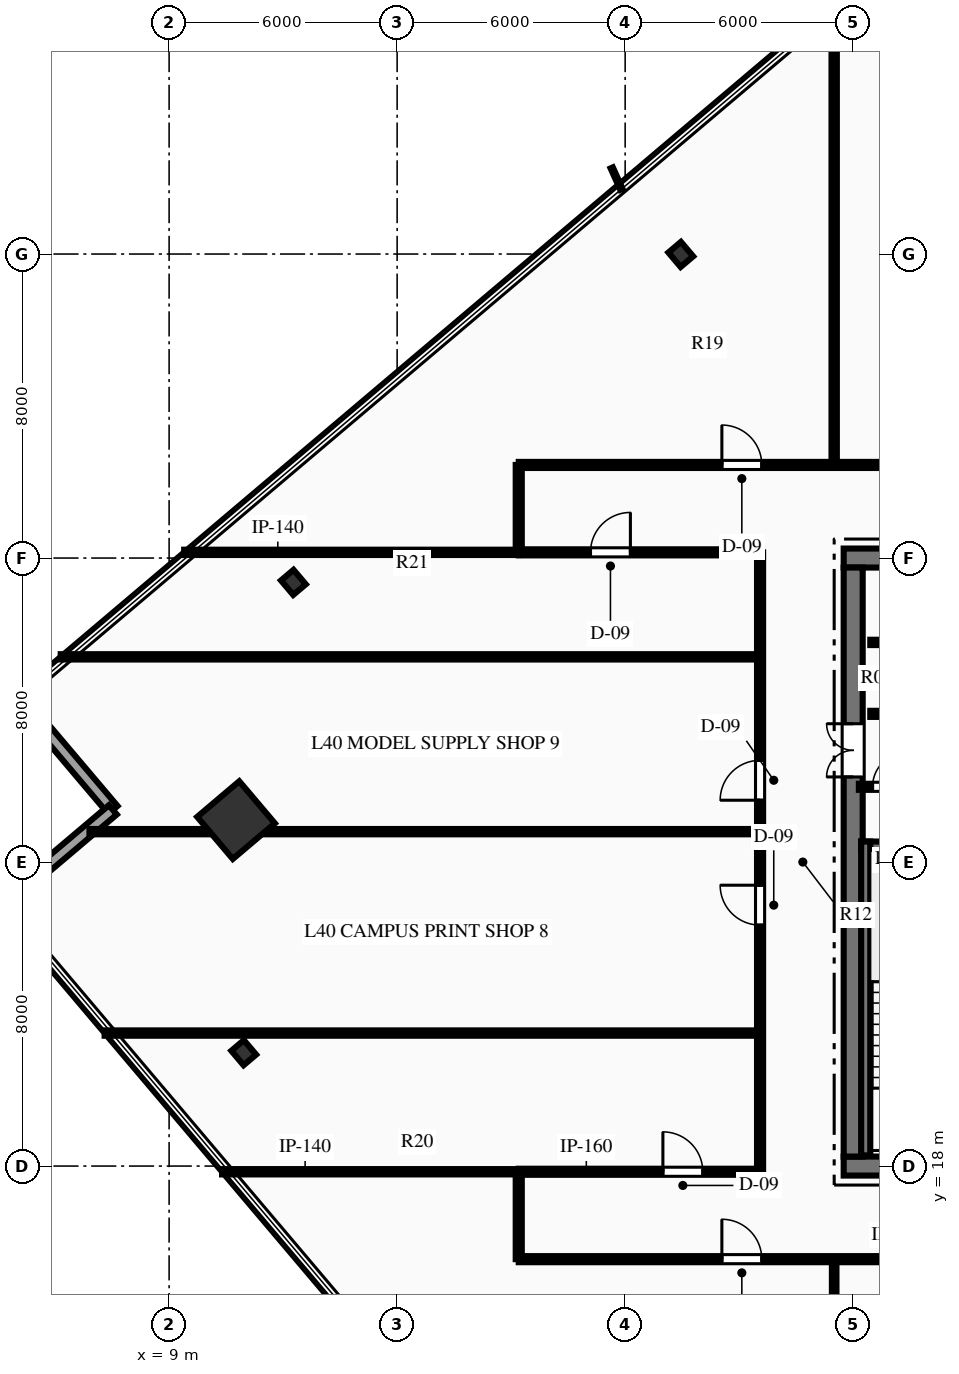
"""IFC4 building model, lengths in metres.
Left out: names, types, materials, properties, quantities, classifications, styles, units other than length and angle.
Written with IfcOpenShell. Run it as: python <this file> out.ifc"""

import sys

from ifc_helpers import new_model, si_unit, direction, frame, frame_2d, origin, origin_2d, place, context, subcontext, project, spatial, rectangle, hollow_rectangle, i_section, extrude, element, fill, save


model = new_model("IFC4")
c1 = context("Model", 3, precision=1e-05, world=origin(), true_north=direction((0.0, 1.0)))
c2 = subcontext(c1, "Body", "Model", "MODEL_VIEW")
j1 = project(units=[si_unit("LENGTHUNIT", "METRE"), si_unit("PLANEANGLEUNIT", "RADIAN")], contexts=[c1])
p1 = place(None, origin())
s1 = spatial("IfcSite", under=j1, at=p1, CompositionType="ELEMENT")
p2 = place(p1, origin())
s2 = spatial("IfcBuilding", under=s1, at=p2, CompositionType="ELEMENT")
p3 = place(p2, frame((0.0, 0.0, 163.2)))
s3 = spatial("IfcBuildingStorey", under=s2, at=p3, CompositionType="ELEMENT", Elevation=163.2)
p4 = place(p3, frame((26.75, 18.0, 0.0), z_axis=(0.0, 0.0, 1.0), x_axis=(1.0, 0.0, 0.0)))
e1 = element("IfcWall", 1, at=p4, inside=s3, PredefinedType="SHEAR", context=c2, shape_type="SweptSolid", body=[
    extrude(rectangle(XDim=18.5, YDim=0.5, at=frame_2d((9.25, 0.0))), origin(), (0.0, 0.0, 1.0), 3.75),
])
p5 = place(p4, frame((7.35, 0.0, 0.0)))
e2 = element("IfcOpeningElement", 2, at=p5, cuts=e1, PredefinedType="OPENING", context=c2, shape_type="SweptSolid", body=[
    extrude(rectangle(XDim=1.1, YDim=2.15, at=frame_2d((0.55, 1.075))), frame((0.0, 0.26, 0.0), z_axis=(0.0, -1.0, 0.0), x_axis=(1.0, 0.0, 0.0)), (0.0, 0.0, 1.0), 0.52),
])
p6 = place(p4, frame((10.05, 0.0, 0.0)))
e3 = element("IfcOpeningElement", 3, at=p6, cuts=e1, PredefinedType="OPENING", context=c2, shape_type="SweptSolid", body=[
    extrude(rectangle(XDim=1.1, YDim=2.15, at=frame_2d((0.55, 1.075))), frame((0.0, 0.26, 0.0), z_axis=(0.0, -1.0, 0.0), x_axis=(1.0, 0.0, 0.0)), (0.0, 0.0, 1.0), 0.52),
])
p7 = place(p3, frame((26.75, 34.0, 0.0), z_axis=(0.0, 0.0, 1.0), x_axis=(1.0, 0.0, 0.0)))
e4 = element("IfcWall", 4, at=p7, inside=s3, PredefinedType="SHEAR", context=c2, shape_type="SweptSolid", body=[
    extrude(rectangle(XDim=18.5, YDim=0.5, at=frame_2d((9.25, 0.0))), origin(), (0.0, 0.0, 1.0), 3.75),
])
p8 = place(p7, frame((13.935, 0.0, 0.0)))
e5 = element("IfcOpeningElement", 5, at=p8, cuts=e4, PredefinedType="OPENING", context=c2, shape_type="SweptSolid", body=[
    extrude(rectangle(XDim=1.1, YDim=2.15, at=frame_2d((0.55, 1.075))), frame((0.0, 0.26, 0.0), z_axis=(0.0, -1.0, 0.0), x_axis=(1.0, 0.0, 0.0)), (0.0, 0.0, 1.0), 0.52),
])
p9 = place(p7, frame((16.185, 0.0, 0.0)))
e6 = element("IfcOpeningElement", 6, at=p9, cuts=e4, PredefinedType="OPENING", context=c2, shape_type="SweptSolid", body=[
    extrude(rectangle(XDim=1.1, YDim=2.15, at=frame_2d((0.55, 1.075))), frame((0.0, 0.26, 0.0), z_axis=(0.0, -1.0, 0.0), x_axis=(1.0, 0.0, 0.0)), (0.0, 0.0, 1.0), 0.52),
])
p10 = place(p3, frame((27.0, 18.25, 0.0), z_axis=(0.0, 0.0, 1.0), x_axis=(0.0, 1.0, 0.0)))
e7 = element("IfcWall", 7, at=p10, inside=s3, PredefinedType="SHEAR", context=c2, shape_type="SweptSolid", body=[
    extrude(rectangle(XDim=15.5, YDim=0.5, at=frame_2d((7.75, 0.0))), origin(), (0.0, 0.0, 1.0), 3.75),
])
p11 = place(p10, frame((9.99, 0.0, 0.0)))
e8 = element("IfcOpeningElement", 8, at=p11, cuts=e7, PredefinedType="OPENING", context=c2, shape_type="SweptSolid", body=[
    extrude(rectangle(XDim=1.4, YDim=2.2, at=frame_2d((0.7, 1.1))), frame((0.0, 0.26, 0.0), z_axis=(0.0, -1.0, 0.0), x_axis=(1.0, 0.0, 0.0)), (0.0, 0.0, 1.0), 0.52),
])
p12 = place(p3, frame((27.21, 26.42, 0.0), z_axis=(0.0, 0.0, 1.0), x_axis=(1.0, 0.0, 0.0)))
e9 = element("IfcWall", 9, at=p12, inside=s3, PredefinedType="SHEAR", context=c2, shape_type="SweptSolid", body=[
    extrude(rectangle(XDim=3.98, YDim=0.24, at=frame_2d((1.99, 0.0))), origin(), (0.0, 0.0, 1.0), 3.75),
])
p13 = place(p3, frame((27.33, 18.28, 0.0), z_axis=(0.0, 0.0, 1.0), x_axis=(0.0, 1.0, 0.0)))
e10 = element("IfcWall", 10, at=p13, inside=s3, PredefinedType="SHEAR", context=c2, shape_type="SweptSolid", body=[
    extrude(rectangle(XDim=8.26, YDim=0.24, at=frame_2d((4.13, 0.0))), origin(), (0.0, 0.0, 1.0), 3.75),
])
p14 = place(p3, frame((10.761, 27.104, 0.0), z_axis=(0.0, 0.0, 1.0), x_axis=(0.763232469783, 0.646123979643, 0.0)))
e11 = element("IfcColumn", 11, at=p14, inside=s3, PredefinedType="COLUMN", context=c2, shape_type="SweptSolid", body=[
    extrude(hollow_rectangle(XDim=1.45, YDim=1.45, WallThickness=0.07, at=origin_2d()), origin(), (0.0, 0.0, 1.0), 3.75),
])
for number, where, z_axis, x_axis in (
    (12, (22.464, 41.99, 0.0), (0.0, 0.0, 1.0), (0.763, 0.646, 0.0)),
    (13, (12.27, 33.36, 0.0), (0.0, 0.0, 1.0), (0.763, 0.646, 0.0)),
    (14, (10.963, 20.983, 0.0), (0.0, 0.0, 1.0), (0.763, 0.646, 0.0)),
):
    element("IfcColumn", number, at=place(p3, frame(where, z_axis=z_axis, x_axis=x_axis)), inside=s3, PredefinedType="COLUMN", context=c2, shape_type="SweptSolid", body=[
        extrude(i_section(OverallWidth=0.432, OverallDepth=0.498, WebThickness=0.056, FlangeThickness=0.089, at=origin_2d()), origin(), (0.0, 0.0, 1.0), 3.75),
    ])
p15 = place(p3, frame((7.52, 27.373, 0.0), z_axis=(0.0, 0.0, 1.0), x_axis=(-0.646144695405, 0.763214932113, 0.0)))
e15 = element("IfcWall", 15, at=p15, inside=s3, PredefinedType="STANDARD", context=c2, shape_type="SweptSolid", body=[
    extrude(rectangle(XDim=4.0, YDim=0.32, at=frame_2d((2.0, 0.0))), origin(), (0.0, 0.0, 1.0), 3.46),
])
p16 = place(p3, frame((4.467, 24.789, 0.0), z_axis=(0.0, 0.0, 1.0), x_axis=(0.763240413737, 0.646114595748, 0.0)))
e16 = element("IfcWall", 16, at=p16, inside=s3, PredefinedType="STANDARD", context=c2, shape_type="SweptSolid", body=[
    extrude(rectangle(XDim=4.0, YDim=0.32, at=frame_2d((2.0, 0.0))), origin(), (0.0, 0.0, 1.0), 3.46),
])
p17 = place(p3, frame((27.15, 27.98, 0.0), z_axis=(0.0, 0.0, 1.0), x_axis=(1.0, 0.0, 0.0)))
e17 = element("IfcWall", 17, at=p17, inside=s3, PredefinedType="PARTITIONING", context=c2, shape_type="SweptSolid", body=[
    extrude(rectangle(XDim=4.05, YDim=0.16, at=frame_2d((2.025, 0.0))), origin(), (0.0, 0.0, 1.0), 3.46),
])
p18 = place(p17, frame((0.36, 0.0, 0.0)))
e18 = element("IfcOpeningElement", 18, at=p18, cuts=e17, PredefinedType="OPENING", context=c2, shape_type="SweptSolid", body=[
    extrude(rectangle(XDim=0.9, YDim=2.15, at=frame_2d((0.45, 1.075))), frame((0.0, 0.09, 0.0), z_axis=(0.0, -1.0, 0.0), x_axis=(1.0, 0.0, 0.0)), (0.0, 0.0, 1.0), 0.18),
])
p19 = place(p17, frame((1.63, 0.0, 0.0)))
e19 = element("IfcOpeningElement", 19, at=p19, cuts=e17, PredefinedType="OPENING", context=c2, shape_type="SweptSolid", body=[
    extrude(rectangle(XDim=0.9, YDim=2.15, at=frame_2d((0.45, 1.075))), frame((0.0, 0.09, 0.0), z_axis=(0.0, -1.0, 0.0), x_axis=(1.0, 0.0, 0.0)), (0.0, 0.0, 1.0), 0.18),
])
p20 = place(p17, frame((2.788, 0.0, 0.0)))
e20 = element("IfcOpeningElement", 20, at=p20, cuts=e17, PredefinedType="OPENING", context=c2, shape_type="SweptSolid", body=[
    extrude(rectangle(XDim=0.9, YDim=2.15, at=frame_2d((0.45, 1.075))), frame((0.0, 0.09, 0.0), z_axis=(0.0, -1.0, 0.0), x_axis=(1.0, 0.0, 0.0)), (0.0, 0.0, 1.0), 0.18),
])
p21 = place(p3, frame((27.45, 29.9, 0.0), z_axis=(0.0, 0.0, 1.0), x_axis=(1.0, 0.0, 0.0)))
e21 = element("IfcWall", 21, at=p21, inside=s3, PredefinedType="PARTITIONING", context=c2, shape_type="SweptSolid", body=[
    extrude(rectangle(XDim=4.43, YDim=0.16, at=frame_2d((2.215, 0.0))), origin(), (0.0, 0.0, 1.0), 3.46),
])
p22 = place(p21, frame((1.675, 0.0, 0.0)))
e22 = element("IfcOpeningElement", 22, at=p22, cuts=e21, PredefinedType="OPENING", context=c2, shape_type="SweptSolid", body=[
    extrude(rectangle(XDim=0.95, YDim=2.15, at=frame_2d((0.475, 1.075))), frame((0.0, 0.09, 0.0), z_axis=(0.0, -1.0, 0.0), x_axis=(1.0, 0.0, 0.0)), (0.0, 0.0, 1.0), 0.18),
])
p23 = place(p3, frame((27.45, 31.78, 0.0), z_axis=(0.0, 0.0, 1.0), x_axis=(1.0, 0.0, 0.0)))
e23 = element("IfcWall", 23, at=p23, inside=s3, PredefinedType="PARTITIONING", context=c2, shape_type="SweptSolid", body=[
    extrude(rectangle(XDim=4.35, YDim=0.14, at=frame_2d((2.175, 0.0))), origin(), (0.0, 0.0, 1.0), 3.46),
])
p24 = place(p23, frame((1.7, 0.0, 0.0)))
e24 = element("IfcOpeningElement", 24, at=p24, cuts=e23, PredefinedType="OPENING", context=c2, shape_type="SweptSolid", body=[
    extrude(rectangle(XDim=0.9, YDim=2.15, at=frame_2d((0.45, 1.075))), frame((0.0, 0.08, 0.0), z_axis=(0.0, -1.0, 0.0), x_axis=(1.0, 0.0, 0.0)), (0.0, 0.0, 1.0), 0.16),
])
p25 = place(p3, frame((18.2, 15.55, 0.0), z_axis=(0.0, 0.0, 1.0), x_axis=(1.0, 0.0, 0.0)))
e25 = element("IfcWall", 25, at=p25, inside=s3, PredefinedType="PARTITIONING", context=c2, shape_type="SweptSolid", body=[
    extrude(rectangle(XDim=35.6, YDim=0.16, at=frame_2d((17.8, 0.0))), origin(), (0.0, 0.0, 1.0), 3.46),
])
p26 = place(p25, frame((5.345, 0.0, 0.0)))
e26 = element("IfcOpeningElement", 26, at=p26, cuts=e25, PredefinedType="OPENING", context=c2, shape_type="SweptSolid", body=[
    extrude(rectangle(XDim=1.05, YDim=2.15, at=frame_2d((0.525, 1.075))), frame((0.0, 0.09, 0.0), z_axis=(0.0, -1.0, 0.0), x_axis=(1.0, 0.0, 0.0)), (0.0, 0.0, 1.0), 0.18),
])
p27 = place(p25, frame((15.275, 0.0, 0.0)))
e27 = element("IfcOpeningElement", 27, at=p27, cuts=e25, PredefinedType="OPENING", context=c2, shape_type="SweptSolid", body=[
    extrude(rectangle(XDim=1.05, YDim=2.15, at=frame_2d((0.525, 1.075))), frame((0.0, 0.09, 0.0), z_axis=(0.0, -1.0, 0.0), x_axis=(1.0, 0.0, 0.0)), (0.0, 0.0, 1.0), 0.18),
])
p28 = place(p25, frame((25.055, 0.0, 0.0)))
e28 = element("IfcOpeningElement", 28, at=p28, cuts=e25, PredefinedType="OPENING", context=c2, shape_type="SweptSolid", body=[
    extrude(rectangle(XDim=1.05, YDim=2.15, at=frame_2d((0.525, 1.075))), frame((0.0, 0.09, 0.0), z_axis=(0.0, -1.0, 0.0), x_axis=(1.0, 0.0, 0.0)), (0.0, 0.0, 1.0), 0.18),
])
p29 = place(p25, frame((33.433, 0.0, 0.0)))
e29 = element("IfcOpeningElement", 29, at=p29, cuts=e25, PredefinedType="OPENING", context=c2, shape_type="SweptSolid", body=[
    extrude(rectangle(XDim=1.05, YDim=2.15, at=frame_2d((0.525, 1.075))), frame((0.0, 0.09, 0.0), z_axis=(0.0, -1.0, 0.0), x_axis=(1.0, 0.0, 0.0)), (0.0, 0.0, 1.0), 0.18),
])
p30 = place(p3, frame((18.2, 17.85, 0.0), z_axis=(0.0, 0.0, 1.0), x_axis=(1.0, 0.0, 0.0)))
e30 = element("IfcWall", 30, at=p30, inside=s3, PredefinedType="PARTITIONING", context=c2, shape_type="SweptSolid", body=[
    extrude(rectangle(XDim=6.35, YDim=0.16, at=frame_2d((3.175, 0.0))), origin(), (0.0, 0.0, 1.0), 3.46),
])
p31 = place(p30, frame((3.793, 0.0, 0.0)))
e31 = element("IfcOpeningElement", 31, at=p31, cuts=e30, PredefinedType="OPENING", context=c2, shape_type="SweptSolid", body=[
    extrude(rectangle(XDim=1.05, YDim=2.15, at=frame_2d((0.525, 1.075))), frame((0.0, 0.09, 0.0), z_axis=(0.0, -1.0, 0.0), x_axis=(1.0, 0.0, 0.0)), (0.0, 0.0, 1.0), 0.18),
])
p32 = place(p3, frame((18.2, 36.45, 0.0), z_axis=(0.0, 0.0, 1.0), x_axis=(1.0, 0.0, 0.0)))
e32 = element("IfcWall", 32, at=p32, inside=s3, PredefinedType="PARTITIONING", context=c2, shape_type="SweptSolid", body=[
    extrude(rectangle(XDim=35.6, YDim=0.16, at=frame_2d((17.8, 0.0))), origin(), (0.0, 0.0, 1.0), 3.46),
])
p33 = place(p32, frame((20.05, 0.0, 0.0)))
e33 = element("IfcOpeningElement", 33, at=p33, cuts=e32, PredefinedType="OPENING", context=c2, shape_type="SweptSolid", body=[
    extrude(rectangle(XDim=0.9, YDim=2.15, at=frame_2d((0.45, 1.075))), frame((0.0, 0.09, 0.0), z_axis=(0.0, -1.0, 0.0), x_axis=(1.0, 0.0, 0.0)), (0.0, 0.0, 1.0), 0.18),
])
p34 = place(p32, frame((22.35, 0.0, 0.0)))
e34 = element("IfcOpeningElement", 34, at=p34, cuts=e32, PredefinedType="OPENING", context=c2, shape_type="SweptSolid", body=[
    extrude(rectangle(XDim=0.9, YDim=2.15, at=frame_2d((0.45, 1.075))), frame((0.0, 0.09, 0.0), z_axis=(0.0, -1.0, 0.0), x_axis=(1.0, 0.0, 0.0)), (0.0, 0.0, 1.0), 0.18),
])
p35 = place(p32, frame((24.6, 0.0, 0.0)))
e35 = element("IfcOpeningElement", 35, at=p35, cuts=e32, PredefinedType="OPENING", context=c2, shape_type="SweptSolid", body=[
    extrude(rectangle(XDim=1.0, YDim=2.15, at=frame_2d((0.5, 1.075))), frame((0.0, 0.09, 0.0), z_axis=(0.0, -1.0, 0.0), x_axis=(1.0, 0.0, 0.0)), (0.0, 0.0, 1.0), 0.18),
])
p36 = place(p32, frame((5.345, 0.0, 0.0)))
e36 = element("IfcOpeningElement", 36, at=p36, cuts=e32, PredefinedType="OPENING", context=c2, shape_type="SweptSolid", body=[
    extrude(rectangle(XDim=1.05, YDim=2.15, at=frame_2d((0.525, 1.075))), frame((0.0, 0.09, 0.0), z_axis=(0.0, -1.0, 0.0), x_axis=(1.0, 0.0, 0.0)), (0.0, 0.0, 1.0), 0.18),
])
p37 = place(p32, frame((15.395, 0.0, 0.0)))
e37 = element("IfcOpeningElement", 37, at=p37, cuts=e32, PredefinedType="OPENING", context=c2, shape_type="SweptSolid", body=[
    extrude(rectangle(XDim=1.05, YDim=2.15, at=frame_2d((0.525, 1.075))), frame((0.0, 0.09, 0.0), z_axis=(0.0, -1.0, 0.0), x_axis=(1.0, 0.0, 0.0)), (0.0, 0.0, 1.0), 0.18),
])
p38 = place(p3, frame((18.2, 34.15, 0.0), z_axis=(0.0, 0.0, 1.0), x_axis=(1.0, 0.0, 0.0)))
e38 = element("IfcWall", 38, at=p38, inside=s3, PredefinedType="PARTITIONING", context=c2, shape_type="SweptSolid", body=[
    extrude(rectangle(XDim=6.35, YDim=0.16, at=frame_2d((3.175, 0.0))), origin(), (0.0, 0.0, 1.0), 3.46),
])
p39 = place(p38, frame((1.888, 0.0, 0.0)))
e39 = element("IfcOpeningElement", 39, at=p39, cuts=e38, PredefinedType="OPENING", context=c2, shape_type="SweptSolid", body=[
    extrude(rectangle(XDim=1.05, YDim=2.15, at=frame_2d((0.525, 1.075))), frame((0.0, 0.09, 0.0), z_axis=(0.0, -1.0, 0.0), x_axis=(1.0, 0.0, 0.0)), (0.0, 0.0, 1.0), 0.18),
])
p40 = place(p3, frame((24.55, 17.85, 0.0), z_axis=(0.0, 0.0, 1.0), x_axis=(0.0, 1.0, 0.0)))
e40 = element("IfcWall", 40, at=p40, inside=s3, PredefinedType="PARTITIONING", context=c2, shape_type="SweptSolid", body=[
    extrude(rectangle(XDim=16.3, YDim=0.16, at=frame_2d((8.15, 0.0))), origin(), (0.0, 0.0, 1.0), 3.46),
])
p41 = place(p40, frame((6.491, 0.0, 0.0)))
e41 = element("IfcOpeningElement", 41, at=p41, cuts=e40, PredefinedType="OPENING", context=c2, shape_type="SweptSolid", body=[
    extrude(rectangle(XDim=1.05, YDim=2.15, at=frame_2d((0.525, 1.075))), frame((0.0, 0.09, 0.0), z_axis=(0.0, -1.0, 0.0), x_axis=(1.0, 0.0, 0.0)), (0.0, 0.0, 1.0), 0.18),
])
p42 = place(p40, frame((9.777, 0.0, 0.0)))
e42 = element("IfcOpeningElement", 42, at=p42, cuts=e40, PredefinedType="OPENING", context=c2, shape_type="SweptSolid", body=[
    extrude(rectangle(XDim=1.05, YDim=2.15, at=frame_2d((0.525, 1.075))), frame((0.0, 0.09, 0.0), z_axis=(0.0, -1.0, 0.0), x_axis=(1.0, 0.0, 0.0)), (0.0, 0.0, 1.0), 0.18),
])
for number, where, z_axis, x_axis in (
    (43, (18.2, 15.55, 0.0), (0.0, 0.0, 1.0), (0.0, 1.0, 0.0)),
    (44, (18.2, 34.15, 0.0), (0.0, 0.0, 1.0), (0.0, 1.0, 0.0)),
):
    element("IfcWall", number, at=place(p3, frame(where, z_axis=z_axis, x_axis=x_axis)), inside=s3, PredefinedType="PARTITIONING", context=c2, shape_type="SweptSolid", body=[
        extrude(rectangle(XDim=2.3, YDim=0.16, at=frame_2d((1.15, 0.0))), origin(), (0.0, 0.0, 1.0), 3.46),
    ])
p43 = place(p3, frame((10.393, 17.85, 0.0), z_axis=(0.0, 0.0, 1.0), x_axis=(1.0, 0.0, 0.0)))
e45 = element("IfcWall", 45, at=p43, inside=s3, PredefinedType="PARTITIONING", context=c2, shape_type="SweptSolid", body=[
    extrude(rectangle(XDim=7.807, YDim=0.14, at=frame_2d((3.903, 0.0))), origin(), (0.0, 0.0, 1.0), 3.46),
])
p44 = place(p3, frame((9.396, 34.15, 0.0), z_axis=(0.0, 0.0, 1.0), x_axis=(1.0, 0.0, 0.0)))
e46 = element("IfcWall", 46, at=p44, inside=s3, PredefinedType="PARTITIONING", context=c2, shape_type="SweptSolid", body=[
    extrude(rectangle(XDim=8.804, YDim=0.14, at=frame_2d((4.402, 0.0))), origin(), (0.0, 0.0, 1.0), 3.46),
])
p45 = place(p3, frame((26.5, -1.177, 0.0), z_axis=(0.0, 0.0, 1.0), x_axis=(0.0, 1.0, 0.0)))
e47 = element("IfcWall", 47, at=p45, inside=s3, PredefinedType="PARTITIONING", context=c2, shape_type="SweptSolid", body=[
    extrude(rectangle(XDim=16.727, YDim=0.12, at=frame_2d((8.363, 0.0))), origin(), (0.0, 0.0, 1.0), 3.46),
])
p46 = place(p3, frame((26.5, 36.45, 0.0), z_axis=(0.0, 0.0, 1.0), x_axis=(0.0, 1.0, 0.0)))
e48 = element("IfcWall", 48, at=p46, inside=s3, PredefinedType="PARTITIONING", context=c2, shape_type="SweptSolid", body=[
    extrude(rectangle(XDim=12.18, YDim=0.14, at=frame_2d((6.09, 0.0))), origin(), (0.0, 0.0, 1.0), 3.46),
])
p47 = place(p3, frame((7.303, 21.5, 0.0), z_axis=(0.0, 0.0, 1.0), x_axis=(1.0, 0.0, 0.0)))
e49 = element("IfcWall", 49, at=p47, inside=s3, PredefinedType="PARTITIONING", context=c2, shape_type="SweptSolid", body=[
    extrude(rectangle(XDim=17.247, YDim=0.14, at=frame_2d((8.624, 0.0))), origin(), (0.0, 0.0, 1.0), 3.46),
])
p48 = place(p3, frame((6.904, 26.8, 0.0), z_axis=(0.0, 0.0, 1.0), x_axis=(1.0, 0.0, 0.0)))
e50 = element("IfcWall", 50, at=p48, inside=s3, PredefinedType="PARTITIONING", context=c2, shape_type="SweptSolid", body=[
    extrude(rectangle(XDim=17.646, YDim=0.14, at=frame_2d((8.823, 0.0))), origin(), (0.0, 0.0, 1.0), 2.839),
])
p49 = place(p3, frame((6.147, 31.4, 0.0), z_axis=(0.0, 0.0, 1.0), x_axis=(1.0, 0.0, 0.0)))
e51 = element("IfcWall", 51, at=p49, inside=s3, PredefinedType="PARTITIONING", context=c2, shape_type="SweptSolid", body=[
    extrude(rectangle(XDim=18.403, YDim=0.14, at=frame_2d((9.201, 0.0))), origin(), (0.0, 0.0, 1.0), 3.46),
])
p50 = place(p18, origin())
e52 = element("IfcDoor", 52, at=p50, inside=s3, OperationType="SINGLE_SWING_RIGHT", PredefinedType="DOOR", context=c2, shape_type="SweptSolid", body=[
    extrude(rectangle(XDim=0.9, YDim=2.15, at=frame_2d((0.45, 1.075))), frame((0.0, 0.025, 0.0), z_axis=(0.0, -1.0, 0.0), x_axis=(1.0, 0.0, 0.0)), (0.0, 0.0, 1.0), 0.05),
])
fill(e18, e52)
p51 = place(p11, origin())
e53 = element("IfcDoor", 53, at=p51, inside=s3, OperationType="DOUBLE_DOOR_SINGLE_SWING", PredefinedType="DOOR", context=c2, shape_type="SweptSolid", body=[
    extrude(rectangle(XDim=1.4, YDim=2.2, at=frame_2d((0.7, 1.1))), frame((0.0, 0.025, 0.0), z_axis=(0.0, -1.0, 0.0), x_axis=(1.0, 0.0, 0.0)), (0.0, 0.0, 1.0), 0.05),
])
fill(e8, e53)
p52 = place(p26, origin())
e54 = element("IfcDoor", 54, at=p52, inside=s3, OperationType="SINGLE_SWING_LEFT", PredefinedType="DOOR", context=c2, shape_type="SweptSolid", body=[
    extrude(rectangle(XDim=1.05, YDim=2.15, at=frame_2d((0.525, 1.075))), frame((0.0, 0.025, 0.0), z_axis=(0.0, -1.0, 0.0), x_axis=(1.0, 0.0, 0.0)), (0.0, 0.0, 1.0), 0.05),
])
fill(e26, e54)
p53 = place(p36, origin())
e55 = element("IfcDoor", 55, at=p53, inside=s3, OperationType="SINGLE_SWING_LEFT", PredefinedType="DOOR", context=c2, shape_type="SweptSolid", body=[
    extrude(rectangle(XDim=1.05, YDim=2.15, at=frame_2d((0.525, 1.075))), frame((0.0, 0.025, 0.0), z_axis=(0.0, -1.0, 0.0), x_axis=(1.0, 0.0, 0.0)), (0.0, 0.0, 1.0), 0.05),
])
fill(e36, e55)
p54 = place(p31, origin())
e56 = element("IfcDoor", 56, at=p54, inside=s3, OperationType="SINGLE_SWING_LEFT", PredefinedType="DOOR", context=c2, shape_type="SweptSolid", body=[
    extrude(rectangle(XDim=1.05, YDim=2.15, at=frame_2d((0.525, 1.075))), frame((0.0, 0.025, 0.0), z_axis=(0.0, -1.0, 0.0), x_axis=(1.0, 0.0, 0.0)), (0.0, 0.0, 1.0), 0.05),
])
fill(e31, e56)
p55 = place(p41, origin())
e57 = element("IfcDoor", 57, at=p55, inside=s3, OperationType="SINGLE_SWING_RIGHT", PredefinedType="DOOR", context=c2, shape_type="SweptSolid", body=[
    extrude(rectangle(XDim=1.05, YDim=2.15, at=frame_2d((0.525, 1.075))), frame((0.0, 0.025, 0.0), z_axis=(0.0, -1.0, 0.0), x_axis=(1.0, 0.0, 0.0)), (0.0, 0.0, 1.0), 0.05),
])
fill(e41, e57)
p56 = place(p42, origin())
e58 = element("IfcDoor", 58, at=p56, inside=s3, OperationType="SINGLE_SWING_LEFT", PredefinedType="DOOR", context=c2, shape_type="SweptSolid", body=[
    extrude(rectangle(XDim=1.05, YDim=2.15, at=frame_2d((0.525, 1.075))), frame((0.0, 0.025, 0.0), z_axis=(0.0, -1.0, 0.0), x_axis=(1.0, 0.0, 0.0)), (0.0, 0.0, 1.0), 0.05),
])
fill(e42, e58)
p57 = place(p39, origin())
e59 = element("IfcDoor", 59, at=p57, inside=s3, OperationType="SINGLE_SWING_RIGHT", PredefinedType="DOOR", context=c2, shape_type="SweptSolid", body=[
    extrude(rectangle(XDim=1.05, YDim=2.15, at=frame_2d((0.525, 1.075))), frame((0.0, 0.025, 0.0), z_axis=(0.0, -1.0, 0.0), x_axis=(1.0, 0.0, 0.0)), (0.0, 0.0, 1.0), 0.05),
])
fill(e39, e59)
save(model, sys.argv[1])
